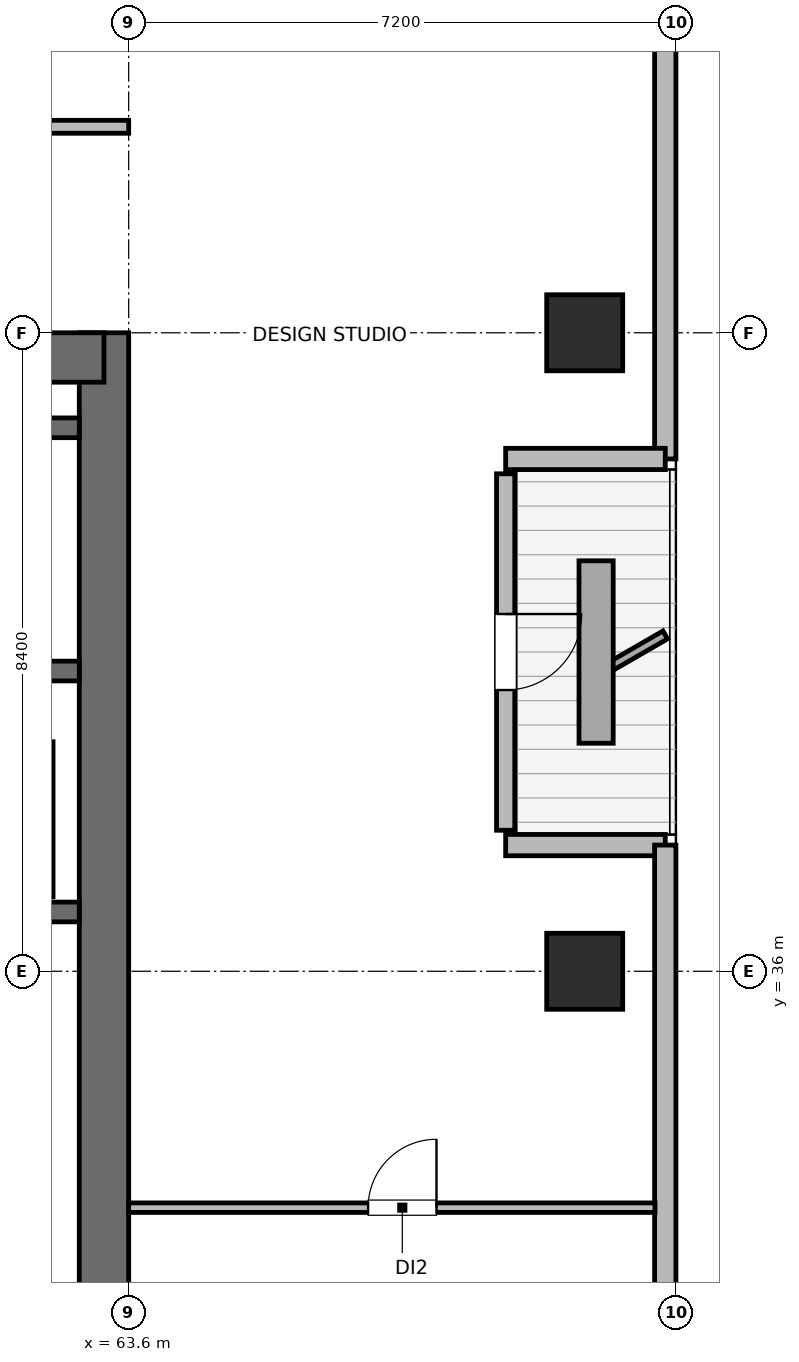
"""IFC4 building model, lengths in metres.
Left out: names, types, materials, properties, quantities, classifications, styles, units other than length and angle.
Written with IfcOpenShell. Run it as: python <this file> out.ifc"""

import sys

from ifc_helpers import new_model, si_unit, direction, frame, frame_2d, origin, origin_2d, place, context, subcontext, project, spatial, rectangle, extrude, element, fill, save


model = new_model("IFC4")
c1 = context("Model", 3, precision=1e-05, world=origin(), true_north=direction((0.0, 1.0)))
c2 = subcontext(c1, "Body", "Model", "MODEL_VIEW")
j1 = project(units=[si_unit("LENGTHUNIT", "METRE"), si_unit("PLANEANGLEUNIT", "RADIAN")], contexts=[c1])
p1 = place(None, origin())
s1 = spatial("IfcSite", under=j1, at=p1, CompositionType="ELEMENT")
p2 = place(p1, origin())
s2 = spatial("IfcBuilding", under=s1, at=p2, CompositionType="ELEMENT")
p3 = place(p2, frame((0.0, 0.0, 258.9)))
s3 = spatial("IfcBuildingStorey", under=s2, at=p3, CompositionType="ELEMENT", Elevation=258.9)
p4 = place(p3, frame((63.275, 27.6, 0.0), z_axis=(0.0, 0.0, 1.0), x_axis=(0.0, 1.0, 0.0)))
e1 = element("IfcWall", 1, at=p4, inside=s3, PredefinedType="SHEAR", context=c2, shape_type="SweptSolid", body=[
    extrude(rectangle(XDim=16.8, YDim=0.65, at=frame_2d((8.4, 0.0))), origin(), (0.0, 0.0, 1.0), 3.9),
])
p5 = place(p3, frame((53.925, 44.075, 0.0), z_axis=(0.0, 0.0, 1.0), x_axis=(1.0, 0.0, 0.0)))
e2 = element("IfcWall", 2, at=p5, inside=s3, PredefinedType="SHEAR", context=c2, shape_type="SweptSolid", body=[
    extrude(rectangle(XDim=9.35, YDim=0.65, at=frame_2d((4.675, 0.0))), origin(), (0.0, 0.0, 1.0), 3.9),
])
p6 = place(p3, frame((58.89, 36.78, 0.0), z_axis=(0.0, 0.0, 1.0), x_axis=(1.0, 0.0, 0.0)))
e3 = element("IfcWall", 3, at=p6, inside=s3, PredefinedType="SHEAR", context=c2, shape_type="SweptSolid", body=[
    extrude(rectangle(XDim=4.06, YDim=0.26, at=frame_2d((2.03, 0.0))), origin(), (0.0, 0.0, 1.0), 3.9),
])
p7 = place(p3, frame((54.25, 39.95, 0.0), z_axis=(0.0, 0.0, 1.0), x_axis=(1.0, 0.0, 0.0)))
e4 = element("IfcWall", 4, at=p7, inside=s3, PredefinedType="SHEAR", context=c2, shape_type="SweptSolid", body=[
    extrude(rectangle(XDim=8.7, YDim=0.26, at=frame_2d((4.35, 0.0))), origin(), (0.0, 0.0, 1.0), 3.9),
])
p8 = place(p7, frame((0.95, 0.0, 0.0)))
e5 = element("IfcOpeningElement", 5, at=p8, cuts=e4, PredefinedType="OPENING", context=c2, shape_type="SweptSolid", body=[
    extrude(rectangle(XDim=1.0, YDim=2.04, at=frame_2d((0.5, 1.02))), frame((0.0, 0.14, 0.0), z_axis=(0.0, -1.0, 0.0), x_axis=(1.0, 0.0, 0.0)), (0.0, 0.0, 1.0), 0.28),
])
p9 = place(p3, frame((54.25, 43.15, 0.0), z_axis=(0.0, 0.0, 1.0), x_axis=(1.0, 0.0, 0.0)))
e6 = element("IfcWall", 6, at=p9, inside=s3, PredefinedType="SHEAR", context=c2, shape_type="SweptSolid", body=[
    extrude(rectangle(XDim=8.7, YDim=0.26, at=frame_2d((4.35, 0.0))), origin(), (0.0, 0.0, 1.0), 3.9),
])
for number, where, z_axis, x_axis in (
    (7, (69.6, 36.0, 0.0), (0.0, 0.0, 1.0), (1.0, 0.0, 0.0)),
    (8, (69.6, 44.4, 0.0), (0.0, 0.0, 1.0), (1.0, 0.0, 0.0)),
):
    element("IfcColumn", number, at=place(p3, frame(where, z_axis=z_axis, x_axis=x_axis)), inside=s3, PredefinedType="COLUMN", context=c2, shape_type="SweptSolid", body=[
        extrude(rectangle(XDim=1.0, YDim=1.0, at=origin_2d()), origin(), (0.0, 0.0, 1.0), 3.9),
    ])
p10 = place(p3, frame((70.66, 48.582, 0.0), z_axis=(0.0, 0.0, 1.0), x_axis=(0.0, -1.0, 0.0)))
e9 = element("IfcWall", 9, at=p10, inside=s3, PredefinedType="SOLIDWALL", context=c2, shape_type="SweptSolid", body=[
    extrude(rectangle(XDim=5.842, YDim=0.28, at=frame_2d((2.921, 0.0))), origin(), (0.0, 0.0, 1.0), 3.68),
])
p11 = place(p3, frame((70.66, 42.74, 0.0), z_axis=(0.0, 0.0, 1.0), x_axis=(-1.0, 0.0, 0.0)))
e10 = element("IfcWall", 10, at=p11, inside=s3, PredefinedType="SOLIDWALL", context=c2, shape_type="SweptSolid", body=[
    extrude(rectangle(XDim=2.1, YDim=0.28, at=frame_2d((1.05, 0.0))), origin(), (0.0, 0.0, 1.0), 3.126),
])
p12 = place(p3, frame((68.56, 42.545, 0.0), z_axis=(0.0, 0.0, 1.0), x_axis=(0.0, -1.0, 0.0)))
e11 = element("IfcWall", 11, at=p12, inside=s3, PredefinedType="SOLIDWALL", context=c2, shape_type="SweptSolid", body=[
    extrude(rectangle(XDim=4.69, YDim=0.24, at=frame_2d((2.345, 0.0))), origin(), (0.0, 0.0, 1.0), 3.311),
])
p13 = place(p12, frame((1.845, 0.0, 0.0)))
e12 = element("IfcOpeningElement", 12, at=p13, cuts=e11, PredefinedType="OPENING", context=c2, shape_type="SweptSolid", body=[
    extrude(rectangle(XDim=1.0, YDim=2.02, at=frame_2d((0.5, 1.01))), frame((0.0, 0.13, 0.0), z_axis=(0.0, -1.0, 0.0), x_axis=(1.0, 0.0, 0.0)), (0.0, 0.0, 1.0), 0.26),
])
p14 = place(p3, frame((68.56, 37.66, 0.0), z_axis=(0.0, 0.0, 1.0), x_axis=(1.0, 0.0, 0.0)))
e13 = element("IfcWall", 13, at=p14, inside=s3, PredefinedType="SOLIDWALL", context=c2, shape_type="SweptSolid", body=[
    extrude(rectangle(XDim=2.1, YDim=0.28, at=frame_2d((1.05, 0.0))), origin(), (0.0, 0.0, 1.0), 3.126),
])
p15 = place(p3, frame((70.66, 37.66, 0.0), z_axis=(0.0, 0.0, 1.0), x_axis=(0.0, -1.0, 0.0)))
e14 = element("IfcWall", 14, at=p15, inside=s3, PredefinedType="SOLIDWALL", context=c2, shape_type="SweptSolid", body=[
    extrude(rectangle(XDim=14.241, YDim=0.28, at=frame_2d((7.121, 0.0))), origin(), (0.0, 0.0, 1.0), 3.68),
])
p16 = place(p15, frame((8.611, 0.0, 0.85)))
e15 = element("IfcOpeningElement", 15, at=p16, cuts=e14, PredefinedType="OPENING", context=c2, shape_type="SweptSolid", body=[
    extrude(rectangle(XDim=1.6, YDim=1.0, at=frame_2d((0.8, 0.5))), frame((0.0, 0.15, 0.0), z_axis=(0.0, -1.0, 0.0), x_axis=(1.0, 0.0, 0.0)), (0.0, 0.0, 1.0), 0.3),
])
p17 = place(p3, frame((62.5, 36.98, 0.0), z_axis=(0.0, 0.0, 1.0), x_axis=(0.0, 1.0, 0.0)))
e16 = element("IfcWall", 16, at=p17, inside=s3, PredefinedType="PARTITIONING", context=c2, shape_type="SweptSolid", body=[
    extrude(rectangle(XDim=2.04, YDim=0.21, at=frame_2d((1.02, 0.0))), origin(), (0.0, 0.0, 1.0), 3.68),
])
p18 = place(p3, frame((29.8, 47.11, 0.0), z_axis=(0.0, 0.0, 1.0), x_axis=(1.0, 0.0, 0.0)))
e17 = element("IfcWall", 17, at=p18, inside=s3, PredefinedType="PARTITIONING", context=c2, shape_type="SweptSolid", body=[
    extrude(rectangle(XDim=33.8, YDim=0.17, at=frame_2d((16.9, 0.0))), origin(), (0.0, 0.0, 1.0), 3.68),
])
p19 = place(p18, frame((0.725, 0.0, 0.0)))
e18 = element("IfcOpeningElement", 18, at=p19, cuts=e17, PredefinedType="OPENING", context=c2, shape_type="SweptSolid", body=[
    extrude(rectangle(XDim=0.95, YDim=2.04, at=frame_2d((0.475, 1.02))), frame((0.0, 0.095, 0.0), z_axis=(0.0, -1.0, 0.0), x_axis=(1.0, 0.0, 0.0)), (0.0, 0.0, 1.0), 0.19),
])
p20 = place(p18, frame((4.425, 0.0, 0.0)))
e19 = element("IfcOpeningElement", 19, at=p20, cuts=e17, PredefinedType="OPENING", context=c2, shape_type="SweptSolid", body=[
    extrude(rectangle(XDim=0.95, YDim=2.04, at=frame_2d((0.475, 1.02))), frame((0.0, 0.095, 0.0), z_axis=(0.0, -1.0, 0.0), x_axis=(1.0, 0.0, 0.0)), (0.0, 0.0, 1.0), 0.19),
])
p21 = place(p18, frame((9.425, 0.0, 0.0)))
e20 = element("IfcOpeningElement", 20, at=p21, cuts=e17, PredefinedType="OPENING", context=c2, shape_type="SweptSolid", body=[
    extrude(rectangle(XDim=0.95, YDim=2.04, at=frame_2d((0.475, 1.02))), frame((0.0, 0.095, 0.0), z_axis=(0.0, -1.0, 0.0), x_axis=(1.0, 0.0, 0.0)), (0.0, 0.0, 1.0), 0.19),
])
p22 = place(p18, frame((14.925, 0.0, 0.0)))
e21 = element("IfcOpeningElement", 21, at=p22, cuts=e17, PredefinedType="OPENING", context=c2, shape_type="SweptSolid", body=[
    extrude(rectangle(XDim=0.95, YDim=2.04, at=frame_2d((0.475, 1.02))), frame((0.0, 0.095, 0.0), z_axis=(0.0, -1.0, 0.0), x_axis=(1.0, 0.0, 0.0)), (0.0, 0.0, 1.0), 0.19),
])
p23 = place(p18, frame((20.925, 0.0, 0.0)))
e22 = element("IfcOpeningElement", 22, at=p23, cuts=e17, PredefinedType="OPENING", context=c2, shape_type="SweptSolid", body=[
    extrude(rectangle(XDim=0.95, YDim=2.04, at=frame_2d((0.475, 1.02))), frame((0.0, 0.095, 0.0), z_axis=(0.0, -1.0, 0.0), x_axis=(1.0, 0.0, 0.0)), (0.0, 0.0, 1.0), 0.19),
])
p24 = place(p18, frame((26.725, 0.0, 0.0)))
e23 = element("IfcOpeningElement", 23, at=p24, cuts=e17, PredefinedType="OPENING", context=c2, shape_type="SweptSolid", body=[
    extrude(rectangle(XDim=0.95, YDim=2.04, at=frame_2d((0.475, 1.02))), frame((0.0, 0.095, 0.0), z_axis=(0.0, -1.0, 0.0), x_axis=(1.0, 0.0, 0.0)), (0.0, 0.0, 1.0), 0.19),
])
p25 = place(p18, frame((31.425, 0.0, 0.0)))
e24 = element("IfcOpeningElement", 24, at=p25, cuts=e17, PredefinedType="OPENING", context=c2, shape_type="SweptSolid", body=[
    extrude(rectangle(XDim=0.95, YDim=2.04, at=frame_2d((0.475, 1.02))), frame((0.0, 0.095, 0.0), z_axis=(0.0, -1.0, 0.0), x_axis=(1.0, 0.0, 0.0)), (0.0, 0.0, 1.0), 0.19),
])
p26 = place(p3, frame((63.6, 32.89, 0.0), z_axis=(0.0, 0.0, 1.0), x_axis=(1.0, 0.0, 0.0)))
e25 = element("IfcWall", 25, at=p26, inside=s3, PredefinedType="PARTITIONING", context=c2, shape_type="SweptSolid", body=[
    extrude(rectangle(XDim=6.925, YDim=0.125, at=frame_2d((3.462, 0.0))), origin(), (0.0, 0.0, 1.0), 3.68),
])
p27 = place(p26, frame((3.15, 0.0, 0.0)))
e26 = element("IfcOpeningElement", 26, at=p27, cuts=e25, PredefinedType="OPENING", context=c2, shape_type="SweptSolid", body=[
    extrude(rectangle(XDim=0.9, YDim=2.02, at=frame_2d((0.45, 1.01))), frame((0.0, 0.073, 0.0), z_axis=(0.0, -1.0, 0.0), x_axis=(1.0, 0.0, 0.0)), (0.0, 0.0, 1.0), 0.145),
])
p28 = place(p13, origin())
e27 = element("IfcDoor", 27, at=p28, inside=s3, OperationType="SINGLE_SWING_LEFT", PredefinedType="DOOR", context=c2, shape_type="SweptSolid", body=[
    extrude(rectangle(XDim=1.0, YDim=2.02, at=frame_2d((0.5, 1.01))), frame((0.0, 0.025, 0.0), z_axis=(0.0, -1.0, 0.0), x_axis=(1.0, 0.0, 0.0)), (0.0, 0.0, 1.0), 0.05),
])
fill(e12, e27)
p29 = place(p27, origin())
e28 = element("IfcDoor", 28, at=p29, inside=s3, OperationType="SINGLE_SWING_RIGHT", PredefinedType="DOOR", context=c2, shape_type="SweptSolid", body=[
    extrude(rectangle(XDim=0.9, YDim=2.02, at=frame_2d((0.45, 1.01))), frame((0.0, 0.025, 0.0), z_axis=(0.0, -1.0, 0.0), x_axis=(1.0, 0.0, 0.0)), (0.0, 0.0, 1.0), 0.05),
])
fill(e26, e28)
save(model, sys.argv[1])
